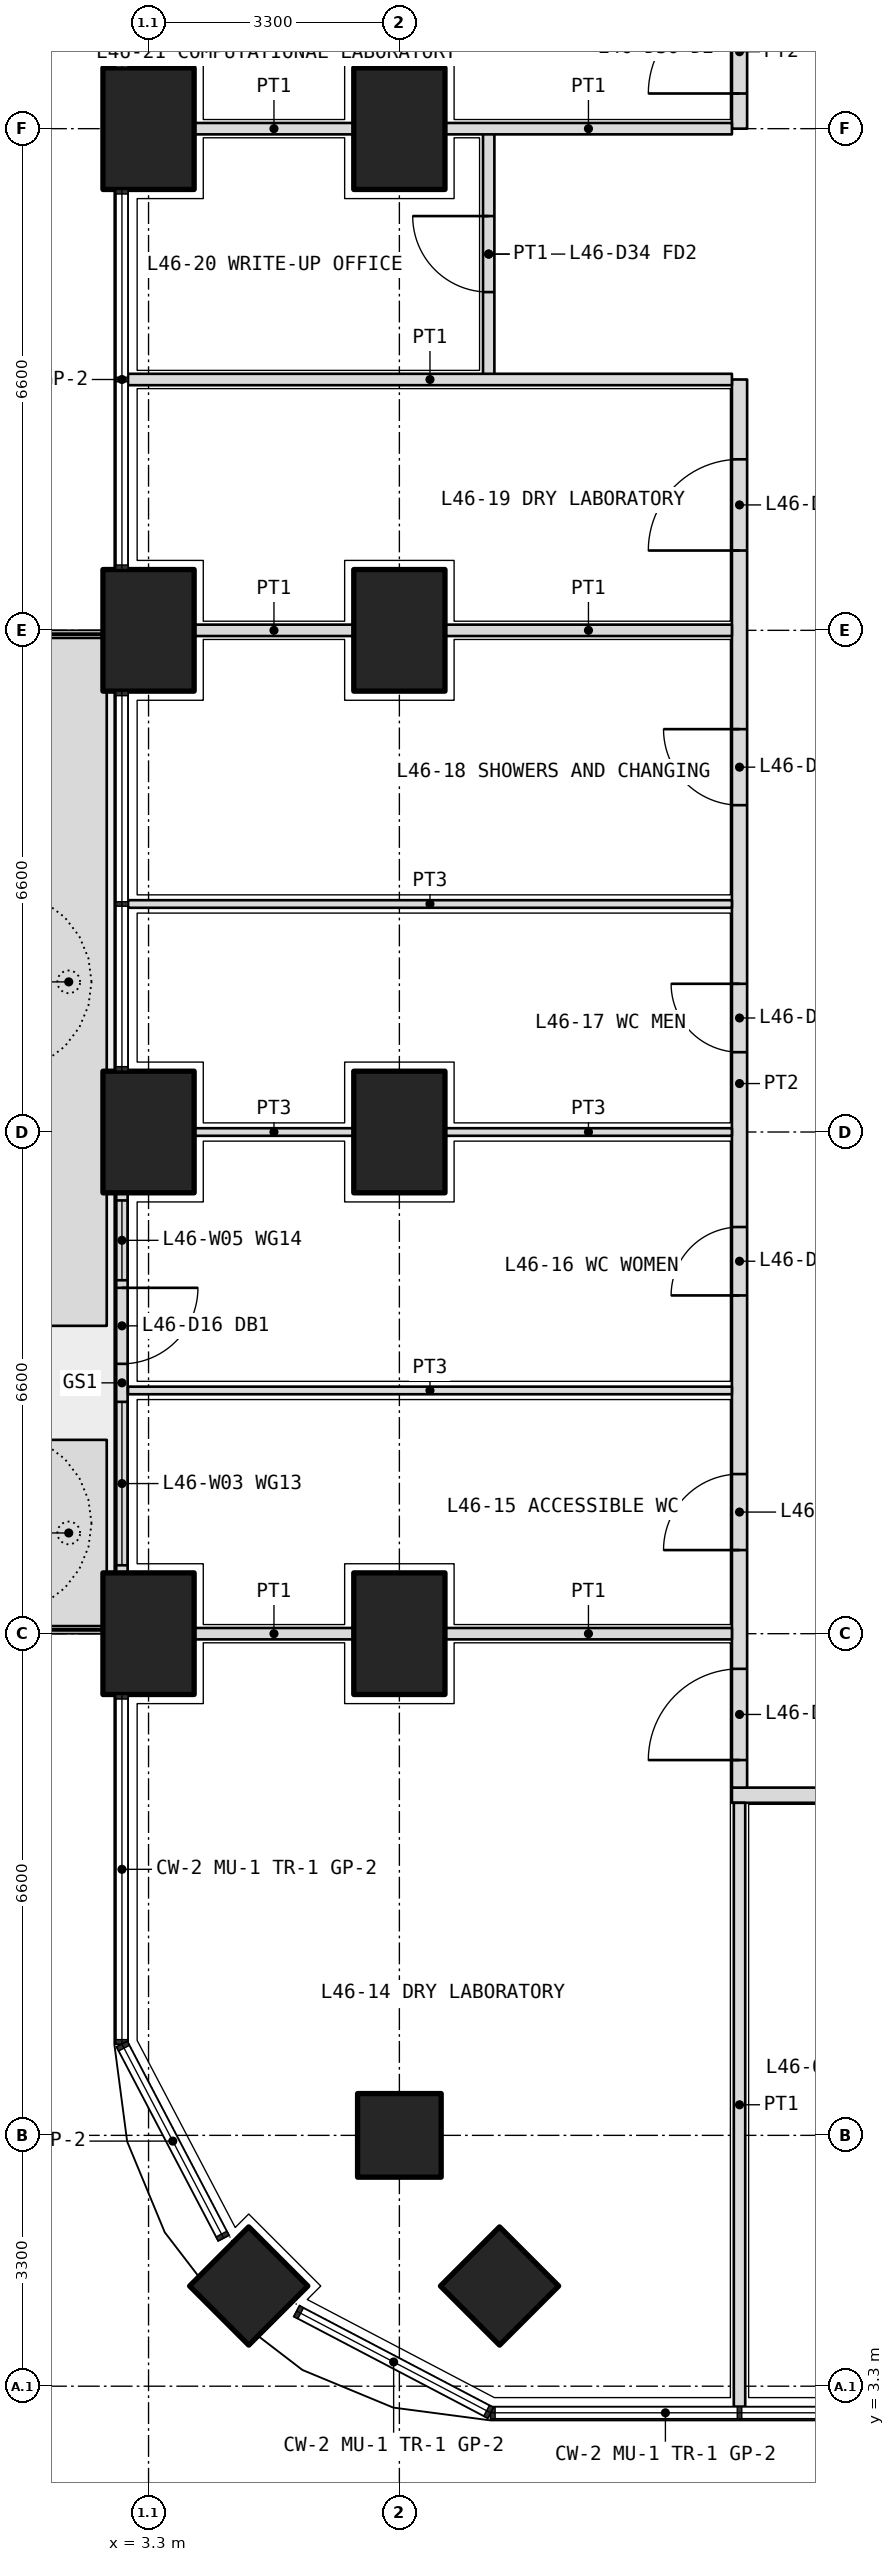
"""IFC4 building model, lengths in metres.
Left out: names, types, materials, properties, quantities, classifications, styles, units other than length and angle.
Written with IfcOpenShell. Run it as: python <this file> out.ifc"""

import sys

from ifc_helpers import new_model, si_unit, direction, frame, frame_2d, origin, origin_2d, place, context, subcontext, project, spatial, polyline, rectangle, outline, extrude, element, fill, save


model = new_model("IFC4")
c1 = context("Model", 3, precision=1e-05, world=origin(), true_north=direction((0.0, 1.0)))
c2 = subcontext(c1, "Body", "Model", "MODEL_VIEW")
j1 = project(units=[si_unit("LENGTHUNIT", "METRE"), si_unit("PLANEANGLEUNIT", "RADIAN")], contexts=[c1])
p1 = place(None, origin())
s1 = spatial("IfcSite", under=j1, at=p1, CompositionType="ELEMENT")
p2 = place(p1, origin())
s2 = spatial("IfcBuilding", under=s1, at=p2, CompositionType="ELEMENT")
p3 = place(p2, frame((0.0, 0.0, 201.9)))
s3 = spatial("IfcBuildingStorey", under=s2, at=p3, CompositionType="ELEMENT", Elevation=201.9)
p4 = place(p3, frame((4.618, 4.618, 0.0), z_axis=(0.0, 0.0, 1.0), x_axis=(0.707106781187, 0.707106781187, 0.0)))
e1 = element("IfcColumn", 1, at=p4, inside=s3, PredefinedType="COLUMN", context=c2, shape_type="SweptSolid", body=[
    extrude(rectangle(XDim=1.1, YDim=1.1, at=origin_2d()), origin(), (0.0, 0.0, 1.0), 4.2),
])
for number, where, z_axis, x_axis in (
    (2, (3.3, 13.2, 0.0), (0.0, 0.0, 1.0), (0.0, 1.0, 0.0)),
    (3, (3.3, 19.8, 0.0), (0.0, 0.0, 1.0), (0.0, 1.0, 0.0)),
    (4, (3.3, 26.4, 0.0), (0.0, 0.0, 1.0), (0.0, 1.0, 0.0)),
    (5, (3.3, 33.0, 0.0), (0.0, 0.0, 1.0), (0.0, 1.0, 0.0)),
):
    element("IfcColumn", number, at=place(p3, frame(where, z_axis=z_axis, x_axis=x_axis)), inside=s3, PredefinedType="COLUMN", context=c2, shape_type="SweptSolid", body=[
        extrude(rectangle(XDim=1.6, YDim=1.2, at=origin_2d()), origin(), (0.0, 0.0, 1.0), 4.2),
    ])
for number, where, z_axis, x_axis in (
    (6, (6.6, 6.6, 0.0), (0.0, 0.0, 1.0), (1.0, 0.0, 0.0)),
    (7, (7.918, 4.618, 0.0), (0.0, 0.0, 1.0), (0.707, 0.707, 0.0)),
):
    element("IfcColumn", number, at=place(p3, frame(where, z_axis=z_axis, x_axis=x_axis)), inside=s3, PredefinedType="COLUMN", context=c2, shape_type="SweptSolid", body=[
        extrude(rectangle(XDim=1.1, YDim=1.1, at=origin_2d()), origin(), (0.0, 0.0, 1.0), 4.2),
    ])
for number, where, z_axis, x_axis in (
    (8, (6.6, 13.2, 0.0), (0.0, 0.0, 1.0), (0.0, 1.0, 0.0)),
    (9, (6.6, 19.8, 0.0), (0.0, 0.0, 1.0), (0.0, 1.0, 0.0)),
    (10, (6.6, 26.4, 0.0), (0.0, 0.0, 1.0), (0.0, 1.0, 0.0)),
    (11, (6.6, 33.0, 0.0), (0.0, 0.0, 1.0), (0.0, 1.0, 0.0)),
):
    element("IfcColumn", number, at=place(p3, frame(where, z_axis=z_axis, x_axis=x_axis)), inside=s3, PredefinedType="COLUMN", context=c2, shape_type="SweptSolid", body=[
        extrude(rectangle(XDim=1.6, YDim=1.2, at=origin_2d()), origin(), (0.0, 0.0, 1.0), 4.2),
    ])
p5 = place(p3, origin())
e12 = element("IfcWall", 12, at=p5, inside=s3, PredefinedType="USERDEFINED", context=c2, shape_type="SweptSolid", body=[
    extrude(outline(polyline([(1.75, 13.3), (2.75, 13.3), (2.75, 15.75), (1.75, 15.75), (1.75, 13.3)]), holes=[polyline([(1.9, 13.45), (2.6, 13.45), (2.6, 15.6), (1.9, 15.6), (1.9, 13.45)])]), origin(), (0.0, 0.0, 1.0), 1.05),
])
p6 = place(p3, origin())
e13 = element("IfcWall", 13, at=p6, inside=s3, PredefinedType="USERDEFINED", context=c2, shape_type="SweptSolid", body=[
    extrude(outline(polyline([(1.75, 17.25), (2.75, 17.25), (2.75, 26.3), (1.75, 26.3), (1.75, 17.25)]), holes=[polyline([(1.9, 17.4), (2.6, 17.4), (2.6, 26.15), (1.9, 26.15), (1.9, 17.4)])]), origin(), (0.0, 0.0, 1.0), 1.05),
])
p7 = place(p3, frame((2.95, 19.0, 0.0), z_axis=(0.0, 0.0, 1.0), x_axis=(0.0, -1.0, 0.0)))
e14 = element("IfcWall", 14, at=p7, inside=s3, PredefinedType="SOLIDWALL", context=c2, shape_type="SweptSolid", body=[
    extrude(rectangle(XDim=5.0, YDim=0.15, at=frame_2d((2.5, 0.0))), origin(), (0.0, 0.0, 1.0), 2.7),
])
p8 = place(p7, frame((1.25, 0.0, 0.0)))
e15 = element("IfcOpeningElement", 15, at=p8, cuts=e14, PredefinedType="OPENING", context=c2, shape_type="SweptSolid", body=[
    extrude(rectangle(XDim=1.0, YDim=2.4, at=frame_2d((0.5, 1.2))), frame((0.0, 0.085, 0.0), z_axis=(0.0, -1.0, 0.0), x_axis=(1.0, 0.0, 0.0)), (0.0, 0.0, 1.0), 0.17),
])
p9 = place(p7, frame((0.1, 0.0, 0.1)))
e16 = element("IfcOpeningElement", 16, at=p9, cuts=e14, PredefinedType="OPENING", context=c2, shape_type="SweptSolid", body=[
    extrude(rectangle(XDim=1.05, YDim=2.3, at=frame_2d((0.525, 1.15))), frame((0.0, 0.085, 0.0), z_axis=(0.0, -1.0, 0.0), x_axis=(1.0, 0.0, 0.0)), (0.0, 0.0, 1.0), 0.17),
])
p10 = place(p7, frame((2.75, 0.0, 0.1)))
e17 = element("IfcOpeningElement", 17, at=p10, cuts=e14, PredefinedType="OPENING", context=c2, shape_type="SweptSolid", body=[
    extrude(rectangle(XDim=2.15, YDim=2.3, at=frame_2d((1.075, 1.15))), frame((0.0, 0.085, 0.0), z_axis=(0.0, -1.0, 0.0), x_axis=(1.0, 0.0, 0.0)), (0.0, 0.0, 1.0), 0.17),
])
p11 = place(p3, frame((10.975, 11.075, 0.0), z_axis=(0.0, 0.0, 1.0), x_axis=(1.0, 0.0, 0.0)))
e18 = element("IfcWall", 18, at=p11, inside=s3, PredefinedType="PARTITIONING", context=c2, shape_type="SweptSolid", body=[
    extrude(rectangle(XDim=30.85, YDim=0.2, at=frame_2d((15.425, 0.0))), origin(), (0.0, 0.0, 1.0), 2.85),
])
p12 = place(p11, frame((2.212, 0.0, 0.0)))
e19 = element("IfcOpeningElement", 19, at=p12, cuts=e18, PredefinedType="OPENING", context=c2, shape_type="SweptSolid", body=[
    extrude(rectangle(XDim=1.2, YDim=2.1, at=frame_2d((0.6, 1.05))), frame((0.0, 0.11, 0.0), z_axis=(0.0, -1.0, 0.0), x_axis=(1.0, 0.0, 0.0)), (0.0, 0.0, 1.0), 0.22),
])
p13 = place(p11, frame((16.475, 0.0, 0.0)))
e20 = element("IfcOpeningElement", 20, at=p13, cuts=e18, PredefinedType="OPENING", context=c2, shape_type="SweptSolid", body=[
    extrude(rectangle(XDim=1.2, YDim=2.1, at=frame_2d((0.6, 1.05))), frame((0.0, 0.11, 0.0), z_axis=(0.0, -1.0, 0.0), x_axis=(1.0, 0.0, 0.0)), (0.0, 0.0, 1.0), 0.22),
])
p14 = place(p11, frame((29.087, 0.0, 0.0)))
e21 = element("IfcOpeningElement", 21, at=p14, cuts=e18, PredefinedType="OPENING", context=c2, shape_type="SweptSolid", body=[
    extrude(rectangle(XDim=1.2, YDim=2.1, at=frame_2d((0.6, 1.05))), frame((0.0, 0.11, 0.0), z_axis=(0.0, -1.0, 0.0), x_axis=(1.0, 0.0, 0.0)), (0.0, 0.0, 1.0), 0.22),
])
p15 = place(p3, frame((11.075, 11.175, 0.0), z_axis=(0.0, 0.0, 1.0), x_axis=(0.0, 1.0, 0.0)))
e22 = element("IfcWall", 22, at=p15, inside=s3, PredefinedType="PARTITIONING", context=c2, shape_type="SweptSolid", body=[
    extrude(rectangle(XDim=18.525, YDim=0.2, at=frame_2d((9.262, 0.0))), origin(), (0.0, 0.0, 1.0), 2.85),
])
p16 = place(p15, frame((0.363, 0.0, 0.0)))
e23 = element("IfcOpeningElement", 23, at=p16, cuts=e22, PredefinedType="OPENING", context=c2, shape_type="SweptSolid", body=[
    extrude(rectangle(XDim=1.2, YDim=2.1, at=frame_2d((0.6, 1.05))), frame((0.0, 0.11, 0.0), z_axis=(0.0, -1.0, 0.0), x_axis=(1.0, 0.0, 0.0)), (0.0, 0.0, 1.0), 0.22),
])
p17 = place(p15, frame((3.125, 0.0, 0.0)))
e24 = element("IfcOpeningElement", 24, at=p17, cuts=e22, PredefinedType="OPENING", context=c2, shape_type="SweptSolid", body=[
    extrude(rectangle(XDim=1.0, YDim=2.1, at=frame_2d((0.5, 1.05))), frame((0.0, 0.11, 0.0), z_axis=(0.0, -1.0, 0.0), x_axis=(1.0, 0.0, 0.0)), (0.0, 0.0, 1.0), 0.22),
])
p18 = place(p15, frame((6.475, 0.0, 0.0)))
e25 = element("IfcOpeningElement", 25, at=p18, cuts=e22, PredefinedType="OPENING", context=c2, shape_type="SweptSolid", body=[
    extrude(rectangle(XDim=0.9, YDim=2.1, at=frame_2d((0.45, 1.05))), frame((0.0, 0.11, 0.0), z_axis=(0.0, -1.0, 0.0), x_axis=(1.0, 0.0, 0.0)), (0.0, 0.0, 1.0), 0.22),
])
p19 = place(p15, frame((9.675, 0.0, 0.0)))
e26 = element("IfcOpeningElement", 26, at=p19, cuts=e22, PredefinedType="OPENING", context=c2, shape_type="SweptSolid", body=[
    extrude(rectangle(XDim=0.9, YDim=2.1, at=frame_2d((0.45, 1.05))), frame((0.0, 0.11, 0.0), z_axis=(0.0, -1.0, 0.0), x_axis=(1.0, 0.0, 0.0)), (0.0, 0.0, 1.0), 0.22),
])
p20 = place(p15, frame((12.925, 0.0, 0.0)))
e27 = element("IfcOpeningElement", 27, at=p20, cuts=e22, PredefinedType="OPENING", context=c2, shape_type="SweptSolid", body=[
    extrude(rectangle(XDim=1.0, YDim=2.1, at=frame_2d((0.5, 1.05))), frame((0.0, 0.11, 0.0), z_axis=(0.0, -1.0, 0.0), x_axis=(1.0, 0.0, 0.0)), (0.0, 0.0, 1.0), 0.22),
])
p21 = place(p15, frame((16.275, 0.0, 0.0)))
e28 = element("IfcOpeningElement", 28, at=p21, cuts=e22, PredefinedType="OPENING", context=c2, shape_type="SweptSolid", body=[
    extrude(rectangle(XDim=1.2, YDim=2.1, at=frame_2d((0.6, 1.05))), frame((0.0, 0.11, 0.0), z_axis=(0.0, -1.0, 0.0), x_axis=(1.0, 0.0, 0.0)), (0.0, 0.0, 1.0), 0.22),
])
p22 = place(p3, frame((11.075, 33.0, 0.0), z_axis=(0.0, 0.0, 1.0), x_axis=(0.0, 1.0, 0.0)))
e29 = element("IfcWall", 29, at=p22, inside=s3, PredefinedType="PARTITIONING", context=c2, shape_type="SweptSolid", body=[
    extrude(rectangle(XDim=2.025, YDim=0.2, at=frame_2d((1.012, 0.0))), origin(), (0.0, 0.0, 1.0), 2.85),
])
p23 = place(p22, frame((0.462, 0.0, 0.0)))
e30 = element("IfcOpeningElement", 30, at=p23, cuts=e29, PredefinedType="OPENING", context=c2, shape_type="SweptSolid", body=[
    extrude(rectangle(XDim=1.2, YDim=2.1, at=frame_2d((0.6, 1.05))), frame((0.0, 0.11, 0.0), z_axis=(0.0, -1.0, 0.0), x_axis=(1.0, 0.0, 0.0)), (0.0, 0.0, 1.0), 0.22),
])
p24 = place(p3, frame((11.075, 3.03, 0.0), z_axis=(0.0, 0.0, 1.0), x_axis=(0.0, 1.0, 0.0)))
e31 = element("IfcWall", 31, at=p24, inside=s3, PredefinedType="PARTITIONING", context=c2, shape_type="SweptSolid", body=[
    extrude(rectangle(XDim=7.945, YDim=0.15, at=frame_2d((3.973, 0.0))), origin(), (0.0, 0.0, 1.0), 2.7),
])
p25 = place(p3, frame((3.03, 16.4, 0.0), z_axis=(0.0, 0.0, 1.0), x_axis=(1.0, 0.0, 0.0)))
e32 = element("IfcWall", 32, at=p25, inside=s3, PredefinedType="PARTITIONING", context=c2, shape_type="SweptSolid", body=[
    extrude(rectangle(XDim=7.945, YDim=0.1, at=frame_2d((3.973, 0.0))), origin(), (0.0, 0.0, 1.0), 2.7),
])
p26 = place(p3, frame((3.9, 19.8, 0.0), z_axis=(0.0, 0.0, 1.0), x_axis=(1.0, 0.0, 0.0)))
e33 = element("IfcWall", 33, at=p26, inside=s3, PredefinedType="PARTITIONING", context=c2, shape_type="SweptSolid", body=[
    extrude(rectangle(XDim=2.1, YDim=0.1, at=frame_2d((1.05, 0.0))), origin(), (0.0, 0.0, 1.0), 2.85),
])
p27 = place(p3, frame((7.2, 19.8, 0.0), z_axis=(0.0, 0.0, 1.0), x_axis=(1.0, 0.0, 0.0)))
e34 = element("IfcWall", 34, at=p27, inside=s3, PredefinedType="PARTITIONING", context=c2, shape_type="SweptSolid", body=[
    extrude(rectangle(XDim=3.775, YDim=0.1, at=frame_2d((1.888, 0.0))), origin(), (0.0, 0.0, 1.0), 2.85),
])
p28 = place(p3, frame((3.03, 22.8, 0.0), z_axis=(0.0, 0.0, 1.0), x_axis=(1.0, 0.0, 0.0)))
e35 = element("IfcWall", 35, at=p28, inside=s3, PredefinedType="PARTITIONING", context=c2, shape_type="SweptSolid", body=[
    extrude(rectangle(XDim=7.945, YDim=0.1, at=frame_2d((3.973, 0.0))), origin(), (0.0, 0.0, 1.0), 2.7),
])
p29 = place(p3, frame((7.775, 29.7, 0.0), z_axis=(0.0, 0.0, 1.0), x_axis=(0.0, 1.0, 0.0)))
e36 = element("IfcWall", 36, at=p29, inside=s3, PredefinedType="PARTITIONING", context=c2, shape_type="SweptSolid", body=[
    extrude(rectangle(XDim=3.3, YDim=0.15, at=frame_2d((1.65, 0.0))), origin(), (0.0, 0.0, 1.0), 2.85),
])
p30 = place(p29, frame((1.15, 0.0, 0.0)))
e37 = element("IfcOpeningElement", 37, at=p30, cuts=e36, PredefinedType="OPENING", context=c2, shape_type="SweptSolid", body=[
    extrude(rectangle(XDim=1.0, YDim=2.1, at=frame_2d((0.5, 1.05))), frame((0.0, 0.085, 0.0), z_axis=(0.0, -1.0, 0.0), x_axis=(1.0, 0.0, 0.0)), (0.0, 0.0, 1.0), 0.17),
])
p31 = place(p3, frame((3.9, 13.2, 0.0), z_axis=(0.0, 0.0, 1.0), x_axis=(1.0, 0.0, 0.0)))
e38 = element("IfcWall", 38, at=p31, inside=s3, PredefinedType="PARTITIONING", context=c2, shape_type="SweptSolid", body=[
    extrude(rectangle(XDim=2.1, YDim=0.15, at=frame_2d((1.05, 0.0))), origin(), (0.0, 0.0, 1.0), 2.85),
])
p32 = place(p3, frame((7.2, 13.2, 0.0), z_axis=(0.0, 0.0, 1.0), x_axis=(1.0, 0.0, 0.0)))
e39 = element("IfcWall", 39, at=p32, inside=s3, PredefinedType="PARTITIONING", context=c2, shape_type="SweptSolid", body=[
    extrude(rectangle(XDim=3.775, YDim=0.15, at=frame_2d((1.888, 0.0))), origin(), (0.0, 0.0, 1.0), 2.85),
])
p33 = place(p3, frame((3.9, 26.4, 0.0), z_axis=(0.0, 0.0, 1.0), x_axis=(1.0, 0.0, 0.0)))
e40 = element("IfcWall", 40, at=p33, inside=s3, PredefinedType="PARTITIONING", context=c2, shape_type="SweptSolid", body=[
    extrude(rectangle(XDim=2.1, YDim=0.15, at=frame_2d((1.05, 0.0))), origin(), (0.0, 0.0, 1.0), 2.85),
])
p34 = place(p3, frame((7.2, 26.4, 0.0), z_axis=(0.0, 0.0, 1.0), x_axis=(1.0, 0.0, 0.0)))
e41 = element("IfcWall", 41, at=p34, inside=s3, PredefinedType="PARTITIONING", context=c2, shape_type="SweptSolid", body=[
    extrude(rectangle(XDim=3.775, YDim=0.15, at=frame_2d((1.888, 0.0))), origin(), (0.0, 0.0, 1.0), 2.85),
])
p35 = place(p3, frame((3.03, 29.7, 0.0), z_axis=(0.0, 0.0, 1.0), x_axis=(1.0, 0.0, 0.0)))
e42 = element("IfcWall", 42, at=p35, inside=s3, PredefinedType="PARTITIONING", context=c2, shape_type="SweptSolid", body=[
    extrude(rectangle(XDim=7.945, YDim=0.15, at=frame_2d((3.973, 0.0))), origin(), (0.0, 0.0, 1.0), 2.7),
])
p36 = place(p3, frame((3.9, 33.0, 0.0), z_axis=(0.0, 0.0, 1.0), x_axis=(1.0, 0.0, 0.0)))
e43 = element("IfcWall", 43, at=p36, inside=s3, PredefinedType="PARTITIONING", context=c2, shape_type="SweptSolid", body=[
    extrude(rectangle(XDim=2.1, YDim=0.15, at=frame_2d((1.05, 0.0))), origin(), (0.0, 0.0, 1.0), 2.85),
])
p37 = place(p3, frame((7.2, 33.0, 0.0), z_axis=(0.0, 0.0, 1.0), x_axis=(1.0, 0.0, 0.0)))
e44 = element("IfcWall", 44, at=p37, inside=s3, PredefinedType="PARTITIONING", context=c2, shape_type="SweptSolid", body=[
    extrude(rectangle(XDim=3.775, YDim=0.15, at=frame_2d((1.888, 0.0))), origin(), (0.0, 0.0, 1.0), 2.85),
])
p38 = place(p8, origin())
e45 = element("IfcDoor", 45, at=p38, inside=s3, OperationType="SINGLE_SWING_LEFT", PredefinedType="DOOR", context=c2, shape_type="SweptSolid", body=[
    extrude(rectangle(XDim=1.0, YDim=2.4, at=frame_2d((0.5, 1.2))), frame((0.0, 0.025, 0.0), z_axis=(0.0, -1.0, 0.0), x_axis=(1.0, 0.0, 0.0)), (0.0, 0.0, 1.0), 0.05),
])
fill(e15, e45)
p39 = place(p9, origin())
e46 = element("IfcWindow", 46, at=p39, inside=s3, PartitioningType="SINGLE_PANEL", PredefinedType="WINDOW", context=c2, shape_type="SweptSolid", body=[
    extrude(rectangle(XDim=1.05, YDim=2.3, at=frame_2d((0.525, 1.15))), frame((0.0, 0.03, 0.0), z_axis=(0.0, -1.0, 0.0), x_axis=(1.0, 0.0, 0.0)), (0.0, 0.0, 1.0), 0.06),
])
fill(e16, e46)
p40 = place(p10, origin())
e47 = element("IfcWindow", 47, at=p40, inside=s3, PartitioningType="SINGLE_PANEL", PredefinedType="WINDOW", context=c2, shape_type="SweptSolid", body=[
    extrude(rectangle(XDim=2.15, YDim=2.3, at=frame_2d((1.075, 1.15))), frame((0.0, 0.03, 0.0), z_axis=(0.0, -1.0, 0.0), x_axis=(1.0, 0.0, 0.0)), (0.0, 0.0, 1.0), 0.06),
])
fill(e17, e47)
p41 = place(p16, origin())
e48 = element("IfcDoor", 48, at=p41, inside=s3, OperationType="DOUBLE_DOOR_SINGLE_SWING", PredefinedType="DOOR", context=c2, shape_type="SweptSolid", body=[
    extrude(rectangle(XDim=1.2, YDim=2.1, at=frame_2d((0.6, 1.05))), frame((0.0, 0.025, 0.0), z_axis=(0.0, -1.0, 0.0), x_axis=(1.0, 0.0, 0.0)), (0.0, 0.0, 1.0), 0.05),
])
fill(e23, e48)
p42 = place(p17, origin())
e49 = element("IfcDoor", 49, at=p42, inside=s3, OperationType="SINGLE_SWING_LEFT", PredefinedType="DOOR", context=c2, shape_type="SweptSolid", body=[
    extrude(rectangle(XDim=1.0, YDim=2.1, at=frame_2d((0.5, 1.05))), frame((0.0, 0.025, 0.0), z_axis=(0.0, -1.0, 0.0), x_axis=(1.0, 0.0, 0.0)), (0.0, 0.0, 1.0), 0.05),
])
fill(e24, e49)
p43 = place(p18, origin())
e50 = element("IfcDoor", 50, at=p43, inside=s3, OperationType="SINGLE_SWING_LEFT", PredefinedType="DOOR", context=c2, shape_type="SweptSolid", body=[
    extrude(rectangle(XDim=0.9, YDim=2.1, at=frame_2d((0.45, 1.05))), frame((0.0, 0.025, 0.0), z_axis=(0.0, -1.0, 0.0), x_axis=(1.0, 0.0, 0.0)), (0.0, 0.0, 1.0), 0.05),
])
fill(e25, e50)
p44 = place(p19, origin())
e51 = element("IfcDoor", 51, at=p44, inside=s3, OperationType="SINGLE_SWING_RIGHT", PredefinedType="DOOR", context=c2, shape_type="SweptSolid", body=[
    extrude(rectangle(XDim=0.9, YDim=2.1, at=frame_2d((0.45, 1.05))), frame((0.0, 0.025, 0.0), z_axis=(0.0, -1.0, 0.0), x_axis=(1.0, 0.0, 0.0)), (0.0, 0.0, 1.0), 0.05),
])
fill(e26, e51)
p45 = place(p20, origin())
e52 = element("IfcDoor", 52, at=p45, inside=s3, OperationType="SINGLE_SWING_RIGHT", PredefinedType="DOOR", context=c2, shape_type="SweptSolid", body=[
    extrude(rectangle(XDim=1.0, YDim=2.1, at=frame_2d((0.5, 1.05))), frame((0.0, 0.025, 0.0), z_axis=(0.0, -1.0, 0.0), x_axis=(1.0, 0.0, 0.0)), (0.0, 0.0, 1.0), 0.05),
])
fill(e27, e52)
p46 = place(p21, origin())
e53 = element("IfcDoor", 53, at=p46, inside=s3, OperationType="DOUBLE_DOOR_SINGLE_SWING", PredefinedType="DOOR", context=c2, shape_type="SweptSolid", body=[
    extrude(rectangle(XDim=1.2, YDim=2.1, at=frame_2d((0.6, 1.05))), frame((0.0, 0.025, 0.0), z_axis=(0.0, -1.0, 0.0), x_axis=(1.0, 0.0, 0.0)), (0.0, 0.0, 1.0), 0.05),
])
fill(e28, e53)
p47 = place(p30, origin())
e54 = element("IfcDoor", 54, at=p47, inside=s3, OperationType="SINGLE_SWING_RIGHT", PredefinedType="DOOR", context=c2, shape_type="SweptSolid", body=[
    extrude(rectangle(XDim=1.0, YDim=2.1, at=frame_2d((0.5, 1.05))), frame((0.0, 0.025, 0.0), z_axis=(0.0, -1.0, 0.0), x_axis=(1.0, 0.0, 0.0)), (0.0, 0.0, 1.0), 0.05),
])
fill(e37, e54)
p48 = place(p23, origin())
e55 = element("IfcDoor", 55, at=p48, inside=s3, OperationType="DOUBLE_DOOR_SINGLE_SWING", PredefinedType="DOOR", context=c2, shape_type="SweptSolid", body=[
    extrude(rectangle(XDim=1.2, YDim=2.1, at=frame_2d((0.6, 1.05))), frame((0.0, 0.025, 0.0), z_axis=(0.0, -1.0, 0.0), x_axis=(1.0, 0.0, 0.0)), (0.0, 0.0, 1.0), 0.05),
])
fill(e30, e55)
save(model, sys.argv[1])
